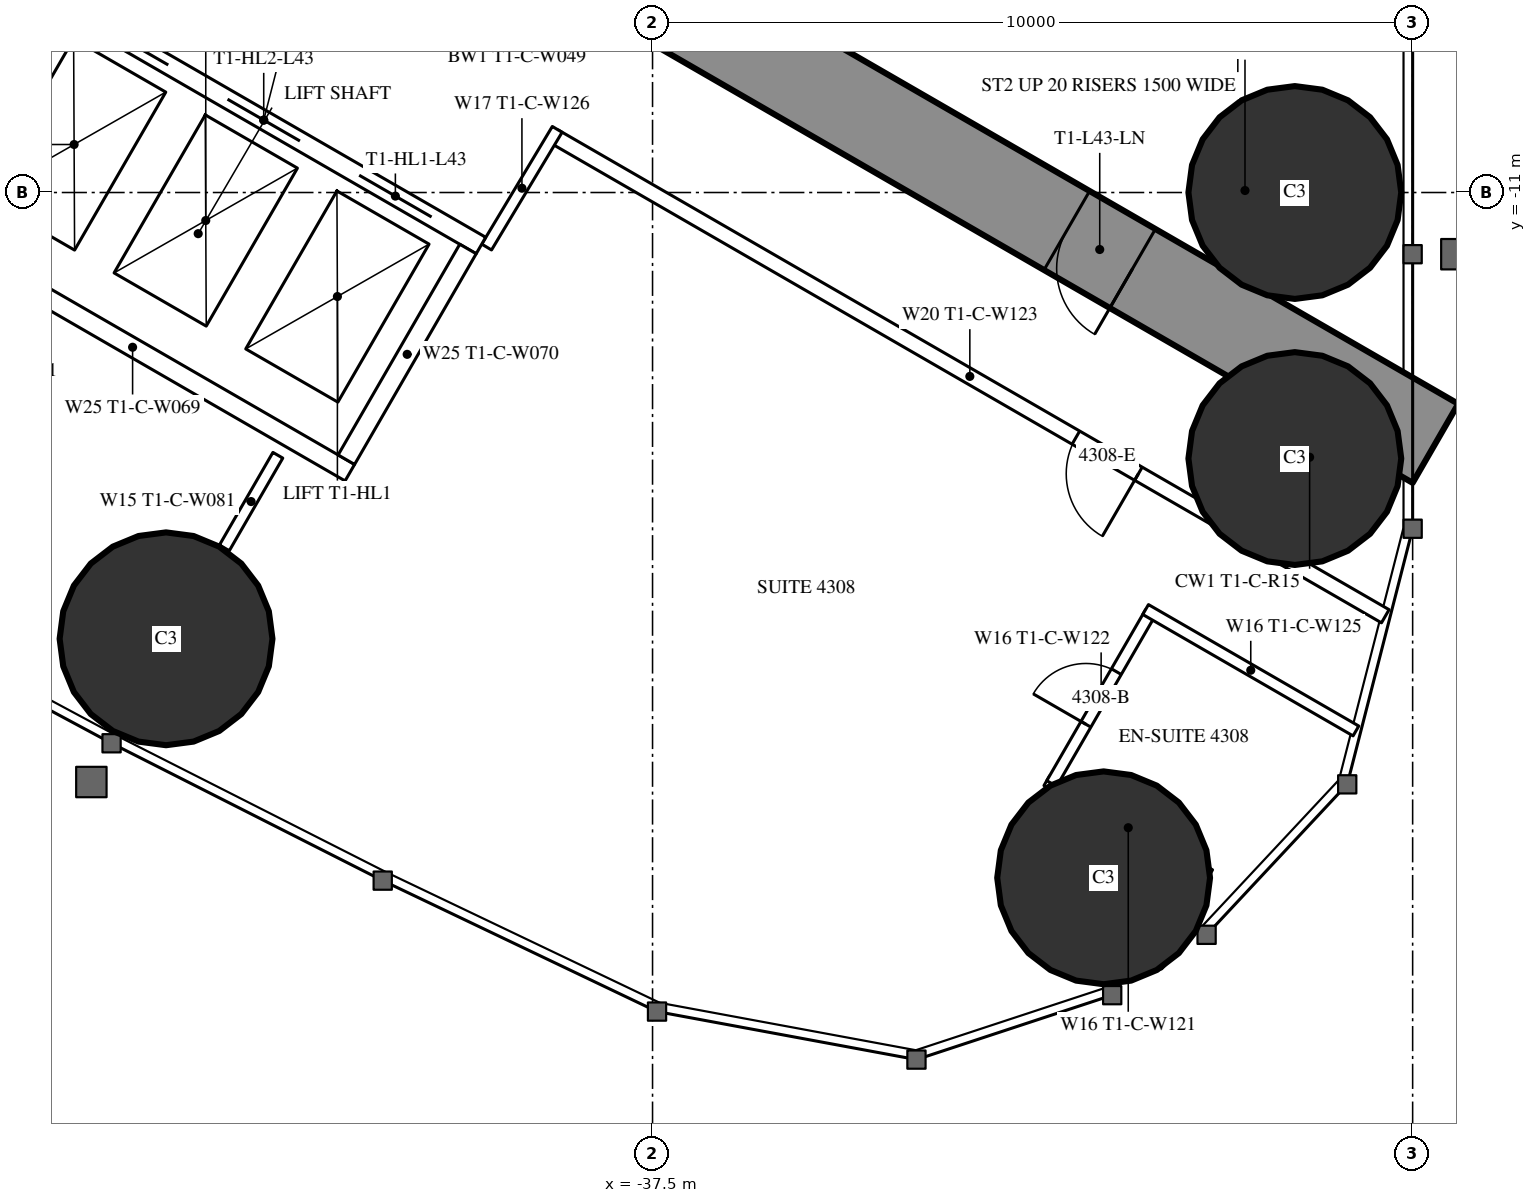
"""IFC4 building model, lengths in metres.
Left out: names, types, materials, properties, quantities, classifications, styles, units other than length and angle.
Written with IfcOpenShell. Run it as: python <this file> out.ifc"""

import sys

from ifc_helpers import new_model, si_unit, direction, frame, frame_2d, origin, origin_2d, place, context, subcontext, project, spatial, rectangle, circle, extrude, element, fill, save


model = new_model("IFC4")
c1 = context("Model", 3, precision=1e-05, world=origin(), true_north=direction((0.0, 1.0)))
c2 = subcontext(c1, "Body", "Model", "MODEL_VIEW")
j1 = project(units=[si_unit("LENGTHUNIT", "METRE"), si_unit("PLANEANGLEUNIT", "RADIAN")], contexts=[c1])
p1 = place(None, origin())
s1 = spatial("IfcSite", under=j1, at=p1, CompositionType="ELEMENT")
p2 = place(p1, origin())
s2 = spatial("IfcBuilding", under=s1, at=p2, CompositionType="ELEMENT")
p3 = place(p2, frame((0.0, 0.0, 163.3)))
s3 = spatial("IfcBuildingStorey", under=s2, at=p3, CompositionType="ELEMENT", Elevation=163.3)
for number, where, z_axis, x_axis in (
    (1, (-31.565, -20.016, 0.0), (0.0, 0.0, 1.0), (1.0, 0.0, 0.0)),
    (2, (-29.05, -11.0, 0.0), (0.0, 0.0, 1.0), (1.0, 0.0, 0.0)),
    (3, (-29.05, -14.5, 0.0), (0.0, 0.0, 1.0), (1.0, 0.0, 0.0)),
    (4, (-43.9, -16.871, 0.0), (0.0, 0.0, 1.0), (1.0, 0.0, 0.0)),
):
    element("IfcColumn", number, at=place(p3, frame(where, z_axis=z_axis, x_axis=x_axis)), inside=s3, PredefinedType="COLUMN", context=c2, shape_type="SweptSolid", body=[
        extrude(circle(Radius=1.4, at=origin_2d()), origin(), (0.0, 0.0, 1.0), 3.5),
    ])
p4 = place(p3, frame((-27.2, -14.3, 0.0), z_axis=(0.0, 0.0, 1.0), x_axis=(-0.866024021859, 0.500002393557, 0.0)))
e5 = element("IfcWall", 5, at=p4, inside=s3, PredefinedType="SHEAR", context=c2, shape_type="SweptSolid", body=[
    extrude(rectangle(XDim=27.907, YDim=1.2, at=frame_2d((13.954, 0.0))), origin(), (0.0, 0.0, 1.0), 3.5),
])
p5 = place(p4, frame((4.6, 0.0, 0.0)))
e6 = element("IfcOpeningElement", 6, at=p5, cuts=e5, PredefinedType="OPENING", context=c2, shape_type="SweptSolid", body=[
    extrude(rectangle(XDim=1.0, YDim=2.2, at=frame_2d((0.5, 1.1))), frame((0.0, 0.61, 0.0), z_axis=(0.0, -1.0, 0.0), x_axis=(1.0, 0.0, 0.0)), (0.0, 0.0, 1.0), 1.22),
])
p6 = place(p4, frame((13.395, 0.0, 0.0)))
e7 = element("IfcOpeningElement", 7, at=p6, cuts=e5, PredefinedType="OPENING", context=c2, shape_type="SweptSolid", body=[
    extrude(rectangle(XDim=1.8, YDim=2.2, at=frame_2d((0.9, 1.1))), frame((0.0, 0.61, 0.0), z_axis=(0.0, -1.0, 0.0), x_axis=(1.0, 0.0, 0.0)), (0.0, 0.0, 1.0), 1.22),
])
p7 = place(p3, frame((-42.429, -14.457, 0.0), z_axis=(0.0, 0.0, 1.0), x_axis=(-0.5000578829, -0.865991982497, 0.0)))
e8 = element("IfcWall", 8, at=p7, inside=s3, PredefinedType="PARTITIONING", context=c2, shape_type="SweptSolid", body=[
    extrude(rectangle(XDim=1.407, YDim=0.15, at=frame_2d((0.704, 0.0))), origin(), (0.0, 0.0, 1.0), 3.25),
])
p8 = place(p3, frame((-27.86, -16.575, 0.0), z_axis=(0.0, 0.0, 1.0), x_axis=(-0.866027756871, 0.499995924312, 0.0)))
e9 = element("IfcWall", 9, at=p8, inside=s3, PredefinedType="PARTITIONING", context=c2, shape_type="SweptSolid", body=[
    extrude(rectangle(XDim=12.622, YDim=0.2, at=frame_2d((6.311, 0.0))), origin(), (0.0, 0.0, 1.0), 3.25),
])
p9 = place(p8, frame((3.75, 0.0, 0.0)))
e10 = element("IfcOpeningElement", 10, at=p9, cuts=e9, PredefinedType="OPENING", context=c2, shape_type="SweptSolid", body=[
    extrude(rectangle(XDim=0.95, YDim=2.2, at=frame_2d((0.475, 1.1))), frame((0.0, 0.11, 0.0), z_axis=(0.0, -1.0, 0.0), x_axis=(1.0, 0.0, 0.0)), (0.0, 0.0, 1.0), 0.22),
])
p10 = place(p3, frame((-39.683, -11.718, 0.0), z_axis=(0.0, 0.0, 1.0), x_axis=(0.514336634837, 0.857588377991, 0.0)))
e11 = element("IfcWall", 11, at=p10, inside=s3, PredefinedType="PARTITIONING", context=c2, shape_type="SweptSolid", body=[
    extrude(rectangle(XDim=1.805, YDim=0.15, at=frame_2d((0.903, 0.0))), origin(), (0.0, 0.0, 1.0), 3.25),
])
p11 = place(p3, frame((-30.17, -19.975, 0.0), z_axis=(0.0, 0.0, 1.0), x_axis=(-0.866006523861, 0.500032699561, 0.0)))
e12 = element("IfcWall", 12, at=p11, inside=s3, PredefinedType="PARTITIONING", context=c2, shape_type="SweptSolid", body=[
    extrude(rectangle(XDim=2.475, YDim=0.15, at=frame_2d((1.237, 0.0))), origin(), (0.0, 0.0, 1.0), 3.25),
])
p12 = place(p3, frame((-30.948, -16.524, 0.0), z_axis=(0.0, 0.0, 1.0), x_axis=(-0.500006934395, -0.866021400173, 0.0)))
e13 = element("IfcWall", 13, at=p12, inside=s3, PredefinedType="PARTITIONING", context=c2, shape_type="SweptSolid", body=[
    extrude(rectangle(XDim=2.6, YDim=0.15, at=frame_2d((1.3, 0.0))), origin(), (0.0, 0.0, 1.0), 2.3),
])
p13 = place(p12, frame((0.9, 0.0, 0.0)))
e14 = element("IfcOpeningElement", 14, at=p13, cuts=e13, PredefinedType="OPENING", context=c2, shape_type="SweptSolid", body=[
    extrude(rectangle(XDim=0.8, YDim=2.2, at=frame_2d((0.4, 1.1))), frame((0.0, 0.085, 0.0), z_axis=(0.0, -1.0, 0.0), x_axis=(1.0, 0.0, 0.0)), (0.0, 0.0, 1.0), 0.17),
])
p14 = place(p3, frame((-28.246, -18.084, 0.0), z_axis=(0.0, 0.0, 1.0), x_axis=(-0.866029063467, 0.49999366119, 0.0)))
e15 = element("IfcWall", 15, at=p14, inside=s3, PredefinedType="PARTITIONING", context=c2, shape_type="SweptSolid", body=[
    extrude(rectangle(XDim=3.195, YDim=0.15, at=frame_2d((1.597, 0.0))), origin(), (0.0, 0.0, 1.0), 3.25),
])
p15 = place(p3, frame((-39.758, -11.697, 0.0), z_axis=(0.0, 0.0, 1.0), x_axis=(-0.866024194504, 0.500002094529, 0.0)))
e16 = element("IfcWall", 16, at=p15, inside=s3, PredefinedType="PARTITIONING", context=c2, shape_type="SweptSolid", body=[
    extrude(rectangle(XDim=6.6, YDim=0.25, at=frame_2d((3.3, 0.0))), origin(), (0.0, 0.0, 1.0), 3.25),
])
p16 = place(p15, frame((0.75, 0.0, 0.0)))
e17 = element("IfcOpeningElement", 17, at=p16, cuts=e16, PredefinedType="OPENING", context=c2, shape_type="SweptSolid", body=[
    extrude(rectangle(XDim=1.1, YDim=2.2, at=frame_2d((0.55, 1.1))), frame((0.0, 0.135, 0.0), z_axis=(0.0, -1.0, 0.0), x_axis=(1.0, 0.0, 0.0)), (0.0, 0.0, 1.0), 0.27),
])
p17 = place(p15, frame((2.75, 0.0, 0.0)))
e18 = element("IfcOpeningElement", 18, at=p17, cuts=e16, PredefinedType="OPENING", context=c2, shape_type="SweptSolid", body=[
    extrude(rectangle(XDim=1.1, YDim=2.2, at=frame_2d((0.55, 1.1))), frame((0.0, 0.135, 0.0), z_axis=(0.0, -1.0, 0.0), x_axis=(1.0, 0.0, 0.0)), (0.0, 0.0, 1.0), 0.27),
])
p18 = place(p15, frame((4.75, 0.0, 0.0)))
e19 = element("IfcOpeningElement", 19, at=p18, cuts=e16, PredefinedType="OPENING", context=c2, shape_type="SweptSolid", body=[
    extrude(rectangle(XDim=1.1, YDim=2.2, at=frame_2d((0.55, 1.1))), frame((0.0, 0.135, 0.0), z_axis=(0.0, -1.0, 0.0), x_axis=(1.0, 0.0, 0.0)), (0.0, 0.0, 1.0), 0.27),
])
p19 = place(p3, frame((-41.482, -14.686, 0.0), z_axis=(0.0, 0.0, 1.0), x_axis=(-0.86603344179, 0.499986077507, 0.0)))
e20 = element("IfcWall", 20, at=p19, inside=s3, PredefinedType="PARTITIONING", context=c2, shape_type="SweptSolid", body=[
    extrude(rectangle(XDim=6.6, YDim=0.25, at=frame_2d((3.3, 0.0))), origin(), (0.0, 0.0, 1.0), 3.25),
])
for number, where, z_axis, x_axis in (
    (21, (-39.928, -11.743, 0.0), (0.0, 0.0, 1.0), (-0.5, -0.866, 0.0)),
    (22, (-45.428, -8.568, 0.0), (0.0, 0.0, 1.0), (-0.5, -0.866, 0.0)),
):
    element("IfcWall", number, at=place(p3, frame(where, z_axis=z_axis, x_axis=x_axis)), inside=s3, PredefinedType="PARTITIONING", context=c2, shape_type="SweptSolid", body=[
        extrude(rectangle(XDim=3.201, YDim=0.25, at=frame_2d((1.6, 0.0))), origin(), (0.0, 0.0, 1.0), 3.25),
    ])
p20 = place(p13, origin())
e23 = element("IfcDoor", 23, at=p20, inside=s3, OperationType="SINGLE_SWING_RIGHT", PredefinedType="DOOR", context=c2, shape_type="SweptSolid", body=[
    extrude(rectangle(XDim=0.8, YDim=2.2, at=frame_2d((0.4, 1.1))), frame((0.0, 0.025, 0.0), z_axis=(0.0, -1.0, 0.0), x_axis=(1.0, 0.0, 0.0)), (0.0, 0.0, 1.0), 0.05),
])
fill(e14, e23)
p21 = place(p9, origin())
e24 = element("IfcDoor", 24, at=p21, inside=s3, OperationType="SINGLE_SWING_LEFT", PredefinedType="DOOR", context=c2, shape_type="SweptSolid", body=[
    extrude(rectangle(XDim=0.95, YDim=2.2, at=frame_2d((0.475, 1.1))), frame((0.0, 0.025, 0.0), z_axis=(0.0, -1.0, 0.0), x_axis=(1.0, 0.0, 0.0)), (0.0, 0.0, 1.0), 0.05),
])
fill(e10, e24)
p22 = place(p5, origin())
e25 = element("IfcDoor", 25, at=p22, inside=s3, OperationType="SINGLE_SWING_LEFT", PredefinedType="DOOR", context=c2, shape_type="SweptSolid", body=[
    extrude(rectangle(XDim=1.0, YDim=2.2, at=frame_2d((0.5, 1.1))), frame((0.0, 0.025, 0.0), z_axis=(0.0, -1.0, 0.0), x_axis=(1.0, 0.0, 0.0)), (0.0, 0.0, 1.0), 0.05),
])
fill(e6, e25)
p23 = place(p16, origin())
e26 = element("IfcDoor", 26, at=p23, inside=s3, OperationType="DOUBLE_DOOR_SLIDING", PredefinedType="USERDEFINED", context=c2, shape_type="SweptSolid", body=[
    extrude(rectangle(XDim=1.1, YDim=2.2, at=frame_2d((0.55, 1.1))), frame((0.0, 0.025, 0.0), z_axis=(0.0, -1.0, 0.0), x_axis=(1.0, 0.0, 0.0)), (0.0, 0.0, 1.0), 0.05),
])
fill(e17, e26)
p24 = place(p17, origin())
e27 = element("IfcDoor", 27, at=p24, inside=s3, OperationType="DOUBLE_DOOR_SLIDING", PredefinedType="USERDEFINED", context=c2, shape_type="SweptSolid", body=[
    extrude(rectangle(XDim=1.1, YDim=2.2, at=frame_2d((0.55, 1.1))), frame((0.0, 0.025, 0.0), z_axis=(0.0, -1.0, 0.0), x_axis=(1.0, 0.0, 0.0)), (0.0, 0.0, 1.0), 0.05),
])
fill(e18, e27)
p25 = place(p18, origin())
e28 = element("IfcDoor", 28, at=p25, inside=s3, OperationType="DOUBLE_DOOR_SLIDING", PredefinedType="USERDEFINED", context=c2, shape_type="SweptSolid", body=[
    extrude(rectangle(XDim=1.1, YDim=2.2, at=frame_2d((0.55, 1.1))), frame((0.0, 0.025, 0.0), z_axis=(0.0, -1.0, 0.0), x_axis=(1.0, 0.0, 0.0)), (0.0, 0.0, 1.0), 0.05),
])
fill(e19, e28)
save(model, sys.argv[1])
